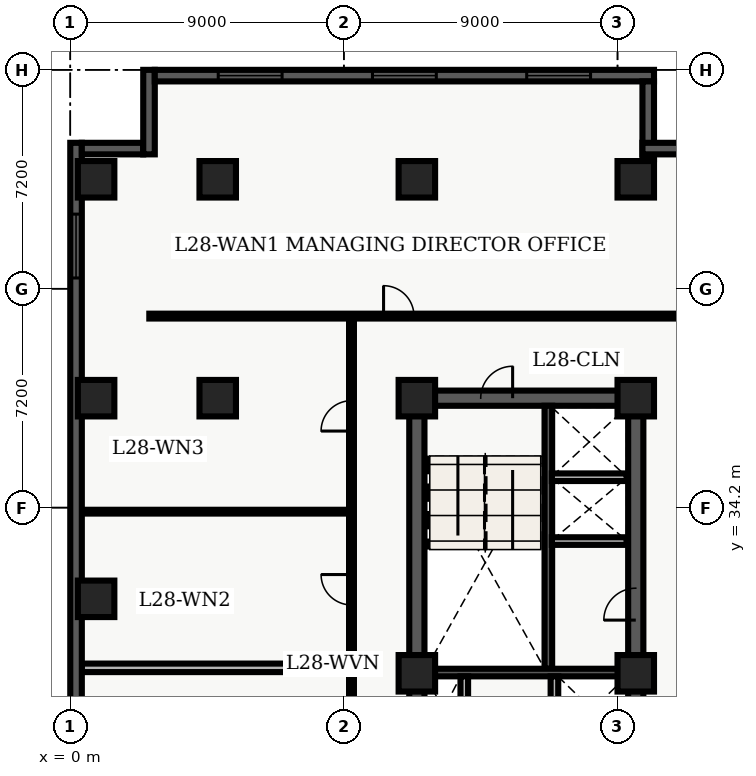
"""IFC4 building model, lengths in metres.
Left out: names, types, materials, properties, quantities, classifications, styles, units other than length and angle.
Written with IfcOpenShell. Run it as: python <this file> out.ifc"""

import sys

from ifc_helpers import new_model, entity, si_unit, converted_unit, direction, frame, origin_with_axes, origin_2d_with_axis, place, context, subcontext, project, spatial, polyline, rectangle, outline, extrude, element, fill, save


model = new_model("IFC4")
c1 = context("Model", 3, precision=1e-05, world=origin_with_axes(), true_north=direction((0.0, 1.0)))
c2 = subcontext(c1, "Body", "Model", "MODEL_VIEW")
j1 = project(units=[si_unit("LENGTHUNIT", "METRE"), converted_unit("PLANEANGLEUNIT", "DEGREE", entity("IfcPlaneAngleMeasure", 0.017), si_unit("PLANEANGLEUNIT", "RADIAN"), dimensions=[0, 0, 0, 0, 0, 0, 0])], contexts=[c1])
p1 = place(None, origin_with_axes())
s1 = spatial("IfcSite", under=j1, at=p1, CompositionType="ELEMENT")
p2 = place(p1, origin_with_axes())
s2 = spatial("IfcBuilding", under=s1, at=p2, CompositionType="ELEMENT")
p3 = place(p2, frame((0.0, 0.0, 116.4), z_axis=(0.0, 0.0, 1.0), x_axis=(1.0, 0.0, 0.0)))
s3 = spatial("IfcBuildingStorey", under=s2, at=p3, CompositionType="ELEMENT", Elevation=116.4)
p4 = place(p3, frame((11.4, 10.8, 0.0), z_axis=(0.0, 0.0, 1.0), x_axis=(0.0, 1.0, 0.0)))
e1 = element("IfcWall", 1, at=p4, inside=s3, PredefinedType="SHEAR", context=c2, shape_type="SweptSolid", body=[
    extrude(outline(polyline([(0.0, -0.25), (27.0, -0.25), (27.0, 0.25), (0.0, 0.25), (0.0, -0.25)])), origin_with_axes(), (0.0, 0.0, 1.0), 3.66),
])
p5 = place(p3, frame((11.4, 37.8, 0.0), z_axis=(0.0, 0.0, 1.0), x_axis=(1.0, 0.0, 0.0)))
e2 = element("IfcWall", 2, at=p5, inside=s3, PredefinedType="SHEAR", context=c2, shape_type="SweptSolid", body=[
    extrude(outline(polyline([(0.0, -0.25), (7.2, -0.25), (7.2, 0.25), (0.0, 0.25), (0.0, -0.25)])), origin_with_axes(), (0.0, 0.0, 1.0), 3.66),
])
p6 = place(p5, frame((2.625, 0.0, 0.0), z_axis=(0.0, 0.0, 1.0), x_axis=(1.0, 0.0, 0.0)))
e3 = element("IfcOpeningElement", 3, at=p6, cuts=e2, PredefinedType="OPENING", context=c2, shape_type="SweptSolid", body=[
    extrude(rectangle(XDim=1.05, YDim=0.52, at=origin_2d_with_axis()), origin_with_axes(), (0.0, 0.0, 1.0), 2.15),
])
p7 = place(p3, frame((18.6, 24.3, 0.0), z_axis=(0.0, 0.0, 1.0), x_axis=(0.0, 1.0, 0.0)))
e4 = element("IfcWall", 4, at=p7, inside=s3, PredefinedType="SHEAR", context=c2, shape_type="SweptSolid", body=[
    extrude(outline(polyline([(0.0, -0.25), (13.5, -0.25), (13.5, 0.25), (0.0, 0.25), (0.0, -0.25)])), origin_with_axes(), (0.0, 0.0, 1.0), 3.66),
])
p8 = place(p7, frame((6.725, 0.0, 0.0), z_axis=(0.0, 0.0, 1.0), x_axis=(1.0, 0.0, 0.0)))
e5 = element("IfcOpeningElement", 5, at=p8, cuts=e4, PredefinedType="OPENING", context=c2, shape_type="SweptSolid", body=[
    extrude(rectangle(XDim=1.05, YDim=0.52, at=origin_2d_with_axis()), origin_with_axes(), (0.0, 0.0, 1.0), 2.15),
])
p9 = place(p3, frame((15.725, 28.9, 0.0), z_axis=(0.0, 0.0, 1.0), x_axis=(0.0, 1.0, 0.0)))
e6 = element("IfcWall", 6, at=p9, inside=s3, PredefinedType="SHEAR", context=c2, shape_type="SweptSolid", body=[
    extrude(outline(polyline([(0.0, -0.125), (8.65, -0.125), (8.65, 0.125), (0.0, 0.125), (0.0, -0.125)])), origin_with_axes(), (0.0, 0.0, 1.0), 3.66),
])
p10 = place(p3, frame((11.65, 28.775, 0.0), z_axis=(0.0, 0.0, 1.0), x_axis=(1.0, 0.0, 0.0)))
e7 = element("IfcWall", 7, at=p10, inside=s3, PredefinedType="SHEAR", context=c2, shape_type="SweptSolid", body=[
    extrude(outline(polyline([(0.0, -0.125), (6.7, -0.125), (6.7, 0.125), (0.0, 0.125), (0.0, -0.125)])), origin_with_axes(), (0.0, 0.0, 1.0), 3.66),
])
for number, where, z_axis, x_axis in (
    (8, (12.96, 26.45, 0.0), (0.0, 0.0, 1.0), (0.0, 1.0, 0.0)),
    (9, (15.925, 26.45, 0.0), (0.0, 0.0, 1.0), (0.0, 1.0, 0.0)),
):
    element("IfcWall", number, at=place(p3, frame(where, z_axis=z_axis, x_axis=x_axis)), inside=s3, PredefinedType="SOLIDWALL", context=c2, shape_type="SweptSolid", body=[
        extrude(outline(polyline([(0.0, -0.125), (2.2, -0.125), (2.2, 0.125), (0.0, 0.125), (0.0, -0.125)])), origin_with_axes(), (0.0, 0.0, 1.0), 2.7),
    ])
for number, where, z_axis, x_axis in (
    (10, (11.4, 28.75, 0.0), (0.0, 0.0, 1.0), (1.0, 0.0, 0.0)),
    (11, (11.4, 37.8, 0.0), (0.0, 0.0, 1.0), (1.0, 0.0, 0.0)),
    (12, (11.4, 45.0, 0.0), (0.0, 0.0, 1.0), (1.0, 0.0, 0.0)),
    (13, (18.6, 28.75, 0.0), (0.0, 0.0, 1.0), (1.0, 0.0, 0.0)),
    (14, (18.6, 37.8, 0.0), (0.0, 0.0, 1.0), (1.0, 0.0, 0.0)),
    (15, (18.6, 45.0, 0.0), (0.0, 0.0, 1.0), (1.0, 0.0, 0.0)),
    (16, (4.85, 37.8, 0.0), (0.0, 0.0, 1.0), (1.0, 0.0, 0.0)),
    (17, (4.85, 45.0, 0.0), (0.0, 0.0, 1.0), (1.0, 0.0, 0.0)),
    (18, (0.85, 31.2, 0.0), (0.0, 0.0, 1.0), (1.0, 0.0, 0.0)),
    (19, (0.85, 37.8, 0.0), (0.0, 0.0, 1.0), (1.0, 0.0, 0.0)),
    (20, (0.85, 45.0, 0.0), (0.0, 0.0, 1.0), (1.0, 0.0, 0.0)),
):
    element("IfcColumn", number, at=place(p3, frame(where, z_axis=z_axis, x_axis=x_axis)), inside=s3, PredefinedType="COLUMN", context=c2, shape_type="SweptSolid", body=[
        extrude(rectangle(XDim=1.2, YDim=1.2, at=origin_2d_with_axis()), origin_with_axes(), (0.0, 0.0, 1.0), 3.9),
    ])
for number, where, z_axis, x_axis in (
    (21, (15.84, 33.1, 0.0), (0.0, 0.0, 1.0), (1.0, 0.0, 0.0)),
    (22, (15.84, 35.2, 0.0), (0.0, 0.0, 1.0), (1.0, 0.0, 0.0)),
):
    element("IfcWall", number, at=place(p3, frame(where, z_axis=z_axis, x_axis=x_axis)), inside=s3, PredefinedType="SOLIDWALL", context=c2, shape_type="SweptSolid", body=[
        extrude(outline(polyline([(0.0, -0.125), (2.46, -0.125), (2.46, 0.125), (0.0, 0.125), (0.0, -0.125)])), origin_with_axes(), (0.0, 0.0, 1.0), 2.7),
    ])
p11 = place(p3, frame((2.6, 40.5, 0.0), z_axis=(0.0, 0.0, 1.0), x_axis=(1.0, 0.0, 0.0)))
e23 = element("IfcWall", 23, at=p11, inside=s3, PredefinedType="PARTITIONING", context=c2, shape_type="SweptSolid", body=[
    extrude(outline(polyline([(0.0, -0.08), (18.65, -0.08), (18.65, 0.08), (0.0, 0.08), (0.0, -0.08)])), origin_with_axes(), (0.0, 0.0, 1.0), 2.7),
])
p12 = place(p11, frame((8.205, 0.0, 0.0), z_axis=(0.0, 0.0, 1.0), x_axis=(1.0, 0.0, 0.0)))
e24 = element("IfcOpeningElement", 24, at=p12, cuts=e23, PredefinedType="OPENING", context=c2, shape_type="SweptSolid", body=[
    extrude(rectangle(XDim=1.0, YDim=0.18, at=origin_2d_with_axis()), origin_with_axes(), (0.0, 0.0, 1.0), 2.15),
])
p13 = place(p3, frame((9.25, 24.4, 0.0), z_axis=(0.0, 0.0, 1.0), x_axis=(0.0, 1.0, 0.0)))
e25 = element("IfcWall", 25, at=p13, inside=s3, PredefinedType="PARTITIONING", context=c2, shape_type="SweptSolid", body=[
    extrude(outline(polyline([(0.0, -0.08), (16.1, -0.08), (16.1, 0.08), (0.0, 0.08), (0.0, -0.08)])), origin_with_axes(), (0.0, 0.0, 1.0), 2.7),
])
p14 = place(p13, frame((2.305, 0.0, 0.0), z_axis=(0.0, 0.0, 1.0), x_axis=(1.0, 0.0, 0.0)))
e26 = element("IfcOpeningElement", 26, at=p14, cuts=e25, PredefinedType="OPENING", context=c2, shape_type="SweptSolid", body=[
    extrude(rectangle(XDim=1.0, YDim=0.18, at=origin_2d_with_axis()), origin_with_axes(), (0.0, 0.0, 1.0), 2.15),
])
p15 = place(p13, frame((7.098, 0.0, 0.0), z_axis=(0.0, 0.0, 1.0), x_axis=(1.0, 0.0, 0.0)))
e27 = element("IfcOpeningElement", 27, at=p15, cuts=e25, PredefinedType="OPENING", context=c2, shape_type="SweptSolid", body=[
    extrude(rectangle(XDim=1.0, YDim=0.18, at=origin_2d_with_axis()), origin_with_axes(), (0.0, 0.0, 1.0), 2.15),
])
p16 = place(p13, frame((12.819, 0.0, 0.0), z_axis=(0.0, 0.0, 1.0), x_axis=(1.0, 0.0, 0.0)))
e28 = element("IfcOpeningElement", 28, at=p16, cuts=e25, PredefinedType="OPENING", context=c2, shape_type="SweptSolid", body=[
    extrude(rectangle(XDim=1.0, YDim=0.18, at=origin_2d_with_axis()), origin_with_axes(), (0.0, 0.0, 1.0), 2.15),
])
p17 = place(p3, frame((0.375, 28.93, 0.0), z_axis=(0.0, 0.0, 1.0), x_axis=(1.0, 0.0, 0.0)))
e29 = element("IfcWall", 29, at=p17, inside=s3, PredefinedType="PARTITIONING", context=c2, shape_type="SweptSolid", body=[
    extrude(outline(polyline([(0.0, -0.14), (8.755, -0.14), (8.755, 0.14), (0.0, 0.14), (0.0, -0.14)])), origin_with_axes(), (0.0, 0.0, 1.0), 2.7),
])
p18 = place(p3, frame((0.375, 34.067, 0.0), z_axis=(0.0, 0.0, 1.0), x_axis=(1.0, 0.0, 0.0)))
e30 = element("IfcWall", 30, at=p18, inside=s3, PredefinedType="PARTITIONING", context=c2, shape_type="SweptSolid", body=[
    extrude(outline(polyline([(0.0, -0.062), (8.755, -0.062), (8.755, 0.062), (0.0, 0.062), (0.0, -0.062)])), origin_with_axes(), (0.0, 0.0, 1.0), 2.7),
])
p19 = place(p3, frame((0.19, 2.78, 0.0), z_axis=(0.0, 0.0, 1.0), x_axis=(0.0, 1.0, 0.0)))
e31 = element("IfcWall", 31, at=p19, inside=s3, PredefinedType="SOLIDWALL", context=c2, shape_type="SweptSolid", body=[
    extrude(outline(polyline([(0.0, -0.19), (43.42, -0.19), (43.42, 0.19), (0.0, 0.19), (0.0, -0.19)])), origin_with_axes(), (0.0, 0.0, 1.0), 3.66),
])
p20 = place(p19, frame((2.946, 0.0, 0.45), z_axis=(0.0, 0.0, 1.0), x_axis=(1.0, 0.0, 0.0)))
e32 = element("IfcOpeningElement", 32, at=p20, cuts=e31, PredefinedType="OPENING", context=c2, shape_type="SweptSolid", body=[
    extrude(rectangle(XDim=2.1, YDim=0.4, at=origin_2d_with_axis()), origin_with_axes(), (0.0, 0.0, 1.0), 2.2),
])
p21 = place(p19, frame((12.328, 0.0, 0.45), z_axis=(0.0, 0.0, 1.0), x_axis=(1.0, 0.0, 0.0)))
e33 = element("IfcOpeningElement", 33, at=p21, cuts=e31, PredefinedType="OPENING", context=c2, shape_type="SweptSolid", body=[
    extrude(rectangle(XDim=2.1, YDim=0.4, at=origin_2d_with_axis()), origin_with_axes(), (0.0, 0.0, 1.0), 2.2),
])
p22 = place(p19, frame((40.024, 0.0, 0.45), z_axis=(0.0, 0.0, 1.0), x_axis=(1.0, 0.0, 0.0)))
e34 = element("IfcOpeningElement", 34, at=p22, cuts=e31, PredefinedType="OPENING", context=c2, shape_type="SweptSolid", body=[
    extrude(rectangle(XDim=2.1, YDim=0.4, at=origin_2d_with_axis()), origin_with_axes(), (0.0, 0.0, 1.0), 2.2),
])
p23 = place(p3, frame((0.38, 46.01, 0.0), z_axis=(0.0, 0.0, 1.0), x_axis=(1.0, 0.0, 0.0)))
e35 = element("IfcWall", 35, at=p23, inside=s3, PredefinedType="SOLIDWALL", context=c2, shape_type="SweptSolid", body=[
    extrude(outline(polyline([(0.0, -0.19), (2.02, -0.19), (2.02, 0.19), (0.0, 0.19), (0.0, -0.19)])), origin_with_axes(), (0.0, 0.0, 1.0), 3.66),
])
p24 = place(p3, frame((2.59, 45.82, 0.0), z_axis=(0.0, 0.0, 1.0), x_axis=(0.0, 1.0, 0.0)))
e36 = element("IfcWall", 36, at=p24, inside=s3, PredefinedType="SOLIDWALL", context=c2, shape_type="SweptSolid", body=[
    extrude(outline(polyline([(0.0, -0.19), (2.78, -0.19), (2.78, 0.19), (0.0, 0.19), (0.0, -0.19)])), origin_with_axes(), (0.0, 0.0, 1.0), 3.66),
])
p25 = place(p3, frame((2.78, 48.41, 0.0), z_axis=(0.0, 0.0, 1.0), x_axis=(1.0, 0.0, 0.0)))
e37 = element("IfcWall", 37, at=p25, inside=s3, PredefinedType="SOLIDWALL", context=c2, shape_type="SweptSolid", body=[
    extrude(outline(polyline([(0.0, -0.19), (16.42, -0.19), (16.42, 0.19), (0.0, 0.19), (0.0, -0.19)])), origin_with_axes(), (0.0, 0.0, 1.0), 3.66),
])
p26 = place(p25, frame((3.137, 0.0, 0.45), z_axis=(0.0, 0.0, 1.0), x_axis=(1.0, 0.0, 0.0)))
e38 = element("IfcOpeningElement", 38, at=p26, cuts=e37, PredefinedType="OPENING", context=c2, shape_type="SweptSolid", body=[
    extrude(rectangle(XDim=2.1, YDim=0.4, at=origin_2d_with_axis()), origin_with_axes(), (0.0, 0.0, 1.0), 2.2),
])
p27 = place(p25, frame((8.21, 0.0, 0.45), z_axis=(0.0, 0.0, 1.0), x_axis=(1.0, 0.0, 0.0)))
e39 = element("IfcOpeningElement", 39, at=p27, cuts=e37, PredefinedType="OPENING", context=c2, shape_type="SweptSolid", body=[
    extrude(rectangle(XDim=2.1, YDim=0.4, at=origin_2d_with_axis()), origin_with_axes(), (0.0, 0.0, 1.0), 2.2),
])
p28 = place(p25, frame((13.283, 0.0, 0.45), z_axis=(0.0, 0.0, 1.0), x_axis=(1.0, 0.0, 0.0)))
e40 = element("IfcOpeningElement", 40, at=p28, cuts=e37, PredefinedType="OPENING", context=c2, shape_type="SweptSolid", body=[
    extrude(rectangle(XDim=2.1, YDim=0.4, at=origin_2d_with_axis()), origin_with_axes(), (0.0, 0.0, 1.0), 2.2),
])
p29 = place(p3, frame((19.01, 48.22, 0.0), z_axis=(0.0, 0.0, 1.0), x_axis=(0.0, -1.0, 0.0)))
e41 = element("IfcWall", 41, at=p29, inside=s3, PredefinedType="SOLIDWALL", context=c2, shape_type="SweptSolid", body=[
    extrude(outline(polyline([(0.0, -0.19), (2.56, -0.19), (2.56, 0.19), (0.0, 0.19), (0.0, -0.19)])), origin_with_axes(), (0.0, 0.0, 1.0), 3.66),
])
p30 = place(p3, frame((18.82, 46.01, 0.0), z_axis=(0.0, 0.0, 1.0), x_axis=(1.0, 0.0, 0.0)))
e42 = element("IfcWall", 42, at=p30, inside=s3, PredefinedType="SOLIDWALL", context=c2, shape_type="SweptSolid", body=[
    extrude(outline(polyline([(0.0, -0.19), (2.78, -0.19), (2.78, 0.19), (0.0, 0.19), (0.0, -0.19)])), origin_with_axes(), (0.0, 0.0, 1.0), 3.66),
])
p31 = place(p5, frame((2.625, 0.0, 0.0), z_axis=(0.0, 0.0, 1.0), x_axis=(1.0, 0.0, 0.0)))
e43 = element("IfcDoor", 43, at=p31, inside=s3, OperationType="SINGLE_SWING_RIGHT", PredefinedType="DOOR", context=c2, shape_type="SweptSolid", body=[
    extrude(rectangle(XDim=1.05, YDim=0.09, at=origin_2d_with_axis()), origin_with_axes(), (0.0, 0.0, 1.0), 2.15),
])
fill(e3, e43)
p32 = place(p7, frame((6.725, 0.0, 0.0), z_axis=(0.0, 0.0, 1.0), x_axis=(1.0, 0.0, 0.0)))
e44 = element("IfcDoor", 44, at=p32, inside=s3, OperationType="SINGLE_SWING_LEFT", PredefinedType="DOOR", context=c2, shape_type="SweptSolid", body=[
    extrude(rectangle(XDim=1.05, YDim=0.09, at=origin_2d_with_axis()), origin_with_axes(), (0.0, 0.0, 1.0), 2.15),
])
fill(e5, e44)
p33 = place(p13, frame((7.098, 0.0, 0.0), z_axis=(0.0, 0.0, 1.0), x_axis=(1.0, 0.0, 0.0)))
e45 = element("IfcDoor", 45, at=p33, inside=s3, OperationType="SINGLE_SWING_RIGHT", PredefinedType="DOOR", context=c2, shape_type="SweptSolid", body=[
    extrude(rectangle(XDim=1.0, YDim=0.09, at=origin_2d_with_axis()), origin_with_axes(), (0.0, 0.0, 1.0), 2.15),
])
fill(e27, e45)
p34 = place(p13, frame((12.819, 0.0, 0.0), z_axis=(0.0, 0.0, 1.0), x_axis=(1.0, 0.0, 0.0)))
e46 = element("IfcDoor", 46, at=p34, inside=s3, OperationType="SINGLE_SWING_LEFT", PredefinedType="DOOR", context=c2, shape_type="SweptSolid", body=[
    extrude(rectangle(XDim=1.0, YDim=0.09, at=origin_2d_with_axis()), origin_with_axes(), (0.0, 0.0, 1.0), 2.15),
])
fill(e28, e46)
p35 = place(p11, frame((8.205, 0.0, 0.0), z_axis=(0.0, 0.0, 1.0), x_axis=(1.0, 0.0, 0.0)))
e47 = element("IfcDoor", 47, at=p35, inside=s3, OperationType="SINGLE_SWING_LEFT", PredefinedType="DOOR", context=c2, shape_type="SweptSolid", body=[
    extrude(rectangle(XDim=1.0, YDim=0.09, at=origin_2d_with_axis()), origin_with_axes(), (0.0, 0.0, 1.0), 2.15),
])
fill(e24, e47)
p36 = place(p19, frame((40.024, 0.0, 0.45), z_axis=(0.0, 0.0, 1.0), x_axis=(1.0, 0.0, 0.0)))
e48 = element("IfcWindow", 48, at=p36, inside=s3, PredefinedType="WINDOW", context=c2, shape_type="SweptSolid", body=[
    extrude(rectangle(XDim=2.1, YDim=0.09, at=origin_2d_with_axis()), origin_with_axes(), (0.0, 0.0, 1.0), 2.2),
])
fill(e34, e48)
p37 = place(p25, frame((3.137, 0.0, 0.45), z_axis=(0.0, 0.0, 1.0), x_axis=(1.0, 0.0, 0.0)))
e49 = element("IfcWindow", 49, at=p37, inside=s3, PredefinedType="WINDOW", context=c2, shape_type="SweptSolid", body=[
    extrude(rectangle(XDim=2.1, YDim=0.09, at=origin_2d_with_axis()), origin_with_axes(), (0.0, 0.0, 1.0), 2.2),
])
fill(e38, e49)
p38 = place(p25, frame((8.21, 0.0, 0.45), z_axis=(0.0, 0.0, 1.0), x_axis=(1.0, 0.0, 0.0)))
e50 = element("IfcWindow", 50, at=p38, inside=s3, PredefinedType="WINDOW", context=c2, shape_type="SweptSolid", body=[
    extrude(rectangle(XDim=2.1, YDim=0.09, at=origin_2d_with_axis()), origin_with_axes(), (0.0, 0.0, 1.0), 2.2),
])
fill(e39, e50)
p39 = place(p25, frame((13.283, 0.0, 0.45), z_axis=(0.0, 0.0, 1.0), x_axis=(1.0, 0.0, 0.0)))
e51 = element("IfcWindow", 51, at=p39, inside=s3, PredefinedType="WINDOW", context=c2, shape_type="SweptSolid", body=[
    extrude(rectangle(XDim=2.1, YDim=0.09, at=origin_2d_with_axis()), origin_with_axes(), (0.0, 0.0, 1.0), 2.2),
])
fill(e40, e51)
save(model, sys.argv[1])
